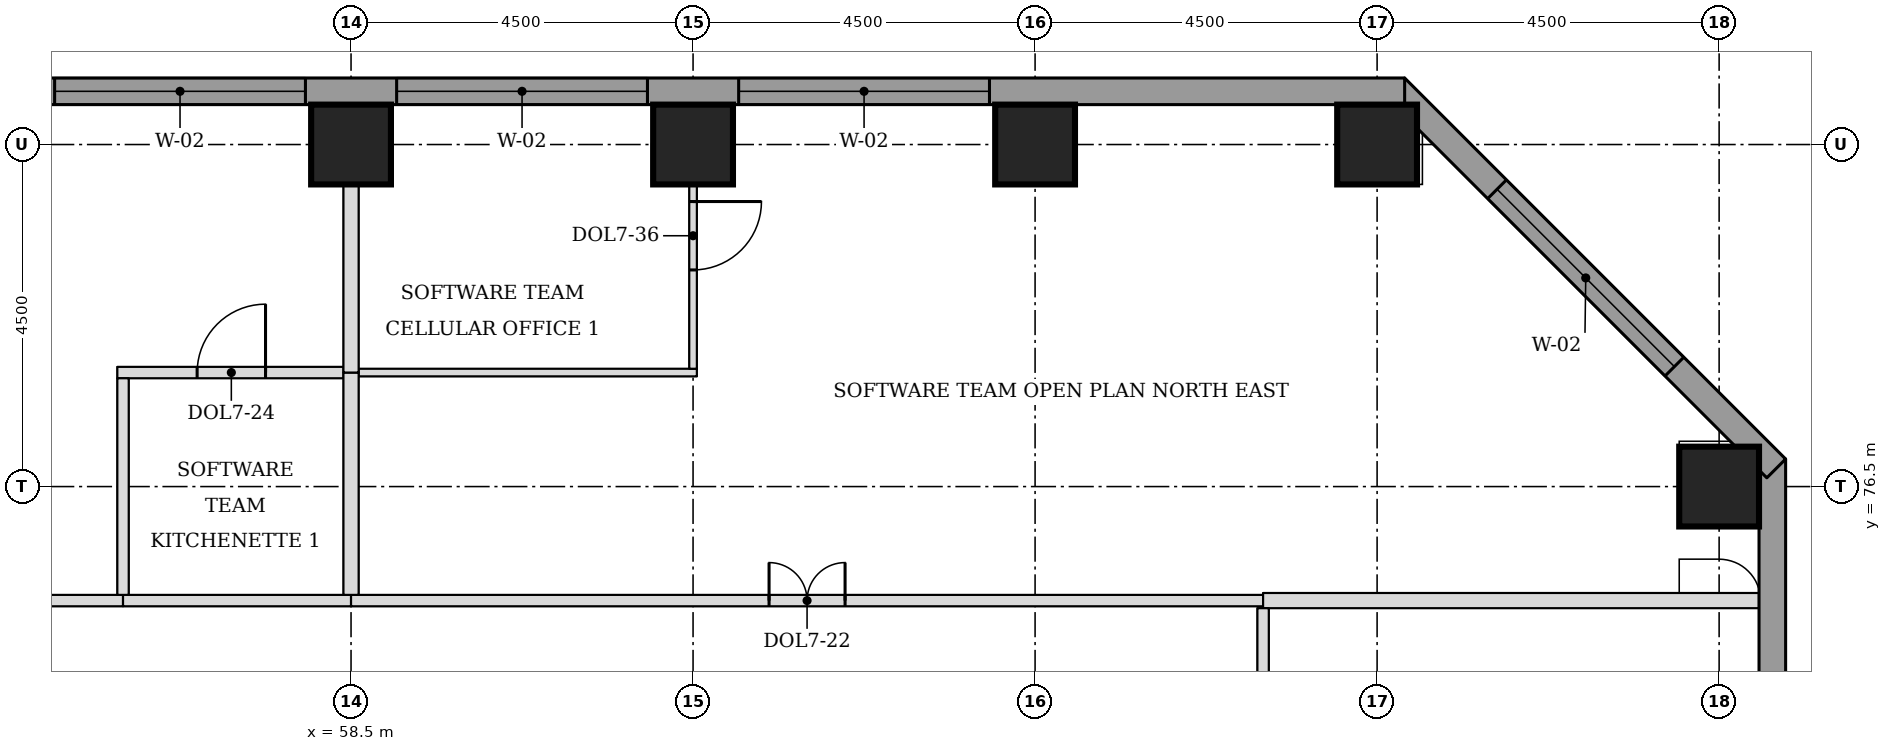
"""IFC4 building model, lengths in metres.
Left out: names, types, materials, properties, quantities, classifications, styles, units other than length and angle.
Written with IfcOpenShell. Run it as: python <this file> out.ifc"""

import sys

from ifc_helpers import new_model, si_unit, direction, frame, frame_2d, origin, origin_2d, place, context, subcontext, project, spatial, rectangle, extrude, element, fill, save


model = new_model("IFC4")
c1 = context("Model", 3, precision=1e-05, world=origin(), true_north=direction((0.0, 1.0)))
c2 = subcontext(c1, "Body", "Model", "MODEL_VIEW")
j1 = project(units=[si_unit("LENGTHUNIT", "METRE"), si_unit("PLANEANGLEUNIT", "RADIAN")], contexts=[c1])
p1 = place(None, origin())
s1 = spatial("IfcSite", under=j1, at=p1, CompositionType="ELEMENT")
p2 = place(p1, origin())
s2 = spatial("IfcBuilding", under=s1, at=p2, CompositionType="ELEMENT")
p3 = place(p2, frame((0.0, 0.0, 134.4)))
s3 = spatial("IfcBuildingStorey", under=s2, at=p3, CompositionType="ELEMENT", Elevation=134.4)
for number, where, z_axis, x_axis in (
    (1, (76.5, 76.5, 0.0), (0.0, 0.0, 1.0), (1.0, 0.0, 0.0)),
    (2, (58.5, 81.0, 0.0), (0.0, 0.0, 1.0), (1.0, 0.0, 0.0)),
    (3, (63.0, 81.0, 0.0), (0.0, 0.0, 1.0), (1.0, 0.0, 0.0)),
    (4, (67.5, 81.0, 0.0), (0.0, 0.0, 1.0), (1.0, 0.0, 0.0)),
    (5, (72.0, 81.0, 0.0), (0.0, 0.0, 1.0), (1.0, 0.0, 0.0)),
):
    element("IfcColumn", number, at=place(p3, frame(where, z_axis=z_axis, x_axis=x_axis)), inside=s3, PredefinedType="COLUMN", context=c2, shape_type="SweptSolid", body=[
        extrude(rectangle(XDim=1.05, YDim=1.05, at=origin_2d()), origin(), (0.0, 0.0, 1.0), 3.7),
    ])
p4 = place(p3, frame((77.2, 44.638, 0.0), z_axis=(0.0, 0.0, 1.0), x_axis=(0.0, 1.0, 0.0)))
e6 = element("IfcWall", 6, at=p4, inside=s3, PredefinedType="STANDARD", context=c2, shape_type="SweptSolid", body=[
    extrude(rectangle(XDim=32.225, YDim=0.35, at=frame_2d((16.112, 0.0))), origin(), (0.0, 0.0, 1.0), 3.525),
])
p5 = place(p4, frame((5.462, 0.0, 0.9)))
e7 = element("IfcOpeningElement", 7, at=p5, cuts=e6, PredefinedType="OPENING", context=c2, shape_type="SweptSolid", body=[
    extrude(rectangle(XDim=3.3, YDim=1.9, at=frame_2d((1.65, 0.95))), frame((0.0, 0.185, 0.0), z_axis=(0.0, -1.0, 0.0), x_axis=(1.0, 0.0, 0.0)), (0.0, 0.0, 1.0), 0.37),
])
p6 = place(p4, frame((9.962, 0.0, 0.9)))
e8 = element("IfcOpeningElement", 8, at=p6, cuts=e6, PredefinedType="OPENING", context=c2, shape_type="SweptSolid", body=[
    extrude(rectangle(XDim=3.3, YDim=1.9, at=frame_2d((1.65, 0.95))), frame((0.0, 0.185, 0.0), z_axis=(0.0, -1.0, 0.0), x_axis=(1.0, 0.0, 0.0)), (0.0, 0.0, 1.0), 0.37),
])
p7 = place(p4, frame((14.462, 0.0, 0.9)))
e9 = element("IfcOpeningElement", 9, at=p7, cuts=e6, PredefinedType="OPENING", context=c2, shape_type="SweptSolid", body=[
    extrude(rectangle(XDim=3.3, YDim=1.9, at=frame_2d((1.65, 0.95))), frame((0.0, 0.185, 0.0), z_axis=(0.0, -1.0, 0.0), x_axis=(1.0, 0.0, 0.0)), (0.0, 0.0, 1.0), 0.37),
])
p8 = place(p4, frame((18.962, 0.0, 0.9)))
e10 = element("IfcOpeningElement", 10, at=p8, cuts=e6, PredefinedType="OPENING", context=c2, shape_type="SweptSolid", body=[
    extrude(rectangle(XDim=3.3, YDim=1.9, at=frame_2d((1.65, 0.95))), frame((0.0, 0.185, 0.0), z_axis=(0.0, -1.0, 0.0), x_axis=(1.0, 0.0, 0.0)), (0.0, 0.0, 1.0), 0.37),
])
p9 = place(p4, frame((23.462, 0.0, 0.9)))
e11 = element("IfcOpeningElement", 11, at=p9, cuts=e6, PredefinedType="OPENING", context=c2, shape_type="SweptSolid", body=[
    extrude(rectangle(XDim=3.3, YDim=1.9, at=frame_2d((1.65, 0.95))), frame((0.0, 0.185, 0.0), z_axis=(0.0, -1.0, 0.0), x_axis=(1.0, 0.0, 0.0)), (0.0, 0.0, 1.0), 0.37),
])
p10 = place(p3, frame((77.251, 76.739, 0.0), z_axis=(0.0, 0.0, 1.0), x_axis=(-0.707106781187, 0.707106781187, 0.0)))
e12 = element("IfcWall", 12, at=p10, inside=s3, PredefinedType="STANDARD", context=c2, shape_type="SweptSolid", body=[
    extrude(rectangle(XDim=7.089, YDim=0.35, at=frame_2d((3.544, 0.0))), origin(), (0.0, 0.0, 1.0), 3.525),
])
p11 = place(p10, frame((1.894, 0.0, 0.9)))
e13 = element("IfcOpeningElement", 13, at=p11, cuts=e12, PredefinedType="OPENING", context=c2, shape_type="SweptSolid", body=[
    extrude(rectangle(XDim=3.3, YDim=1.9, at=frame_2d((1.65, 0.95))), frame((0.0, 0.185, 0.0), z_axis=(0.0, -1.0, 0.0), x_axis=(1.0, 0.0, 0.0)), (0.0, 0.0, 1.0), 0.37),
])
p12 = place(p3, frame((72.362, 81.7, 0.0), z_axis=(0.0, 0.0, 1.0), x_axis=(-1.0, 0.0, 0.0)))
e14 = element("IfcWall", 14, at=p12, inside=s3, PredefinedType="STANDARD", context=c2, shape_type="SweptSolid", body=[
    extrude(rectangle(XDim=32.225, YDim=0.35, at=frame_2d((16.112, 0.0))), origin(), (0.0, 0.0, 1.0), 3.525),
])
p13 = place(p12, frame((5.462, 0.0, 0.9)))
e15 = element("IfcOpeningElement", 15, at=p13, cuts=e14, PredefinedType="OPENING", context=c2, shape_type="SweptSolid", body=[
    extrude(rectangle(XDim=3.3, YDim=1.9, at=frame_2d((1.65, 0.95))), frame((0.0, 0.185, 0.0), z_axis=(0.0, -1.0, 0.0), x_axis=(1.0, 0.0, 0.0)), (0.0, 0.0, 1.0), 0.37),
])
p14 = place(p12, frame((9.962, 0.0, 0.9)))
e16 = element("IfcOpeningElement", 16, at=p14, cuts=e14, PredefinedType="OPENING", context=c2, shape_type="SweptSolid", body=[
    extrude(rectangle(XDim=3.3, YDim=1.9, at=frame_2d((1.65, 0.95))), frame((0.0, 0.185, 0.0), z_axis=(0.0, -1.0, 0.0), x_axis=(1.0, 0.0, 0.0)), (0.0, 0.0, 1.0), 0.37),
])
p15 = place(p12, frame((14.462, 0.0, 0.9)))
e17 = element("IfcOpeningElement", 17, at=p15, cuts=e14, PredefinedType="OPENING", context=c2, shape_type="SweptSolid", body=[
    extrude(rectangle(XDim=3.3, YDim=1.9, at=frame_2d((1.65, 0.95))), frame((0.0, 0.185, 0.0), z_axis=(0.0, -1.0, 0.0), x_axis=(1.0, 0.0, 0.0)), (0.0, 0.0, 1.0), 0.37),
])
p16 = place(p12, frame((18.962, 0.0, 0.9)))
e18 = element("IfcOpeningElement", 18, at=p16, cuts=e14, PredefinedType="OPENING", context=c2, shape_type="SweptSolid", body=[
    extrude(rectangle(XDim=3.3, YDim=1.9, at=frame_2d((1.65, 0.95))), frame((0.0, 0.185, 0.0), z_axis=(0.0, -1.0, 0.0), x_axis=(1.0, 0.0, 0.0)), (0.0, 0.0, 1.0), 0.37),
])
p17 = place(p12, frame((23.462, 0.0, 0.9)))
e19 = element("IfcOpeningElement", 19, at=p17, cuts=e14, PredefinedType="OPENING", context=c2, shape_type="SweptSolid", body=[
    extrude(rectangle(XDim=3.3, YDim=1.9, at=frame_2d((1.65, 0.95))), frame((0.0, 0.185, 0.0), z_axis=(0.0, -1.0, 0.0), x_axis=(1.0, 0.0, 0.0)), (0.0, 0.0, 1.0), 0.37),
])
p18 = place(p3, frame((46.5, 75.0, 0.0), z_axis=(0.0, 0.0, 1.0), x_axis=(1.0, 0.0, 0.0)))
e20 = element("IfcWall", 20, at=p18, inside=s3, PredefinedType="PARTITIONING", context=c2, shape_type="SweptSolid", body=[
    extrude(rectangle(XDim=9.0, YDim=0.15, at=frame_2d((4.5, 0.0))), origin(), (0.0, 0.0, 1.0), 3.55),
])
p19 = place(p3, frame((55.5, 75.0, 0.0), z_axis=(0.0, 0.0, 1.0), x_axis=(1.0, 0.0, 0.0)))
e21 = element("IfcWall", 21, at=p19, inside=s3, PredefinedType="PARTITIONING", context=c2, shape_type="SweptSolid", body=[
    extrude(rectangle(XDim=3.0, YDim=0.15, at=frame_2d((1.5, 0.0))), origin(), (0.0, 0.0, 1.0), 3.55),
])
p20 = place(p3, frame((58.5, 75.0, 0.0), z_axis=(0.0, 0.0, 1.0), x_axis=(1.0, 0.0, 0.0)))
e22 = element("IfcWall", 22, at=p20, inside=s3, PredefinedType="PARTITIONING", context=c2, shape_type="SweptSolid", body=[
    extrude(rectangle(XDim=12.0, YDim=0.15, at=frame_2d((6.0, 0.0))), origin(), (0.0, 0.0, 1.0), 3.55),
])
p21 = place(p20, frame((5.5, 0.0, 0.0)))
e23 = element("IfcOpeningElement", 23, at=p21, cuts=e22, PredefinedType="OPENING", context=c2, shape_type="SweptSolid", body=[
    extrude(rectangle(XDim=1.0, YDim=2.1, at=frame_2d((0.5, 1.05))), frame((0.0, 0.085, 0.0), z_axis=(0.0, -1.0, 0.0), x_axis=(1.0, 0.0, 0.0)), (0.0, 0.0, 1.0), 0.17),
])
p22 = place(p3, frame((70.5, 75.0, 0.0), z_axis=(0.0, 0.0, 1.0), x_axis=(1.0, 0.0, 0.0)))
e24 = element("IfcWall", 24, at=p22, inside=s3, PredefinedType="PARTITIONING", context=c2, shape_type="SweptSolid", body=[
    extrude(rectangle(XDim=6.525, YDim=0.2, at=frame_2d((3.262, 0.0))), origin(), (0.0, 0.0, 1.0), 3.55),
])
p23 = place(p3, frame((55.425, 78.0, 0.0), z_axis=(0.0, 0.0, 1.0), x_axis=(1.0, 0.0, 0.0)))
e25 = element("IfcWall", 25, at=p23, inside=s3, PredefinedType="PARTITIONING", context=c2, shape_type="SweptSolid", body=[
    extrude(rectangle(XDim=2.975, YDim=0.15, at=frame_2d((1.487, 0.0))), origin(), (0.0, 0.0, 1.0), 3.55),
])
p24 = place(p23, frame((1.05, 0.0, 0.0)))
e26 = element("IfcOpeningElement", 26, at=p24, cuts=e25, PredefinedType="OPENING", context=c2, shape_type="SweptSolid", body=[
    extrude(rectangle(XDim=0.9, YDim=2.1, at=frame_2d((0.45, 1.05))), frame((0.0, 0.085, 0.0), z_axis=(0.0, -1.0, 0.0), x_axis=(1.0, 0.0, 0.0)), (0.0, 0.0, 1.0), 0.17),
])
p25 = place(p3, frame((58.6, 78.0, 0.0), z_axis=(0.0, 0.0, 1.0), x_axis=(1.0, 0.0, 0.0)))
e27 = element("IfcWall", 27, at=p25, inside=s3, PredefinedType="PARTITIONING", context=c2, shape_type="SweptSolid", body=[
    extrude(rectangle(XDim=4.45, YDim=0.1, at=frame_2d((2.225, 0.0))), origin(), (0.0, 0.0, 1.0), 3.55),
])
p26 = place(p3, frame((70.5, 63.0, 0.0), z_axis=(0.0, 0.0, 1.0), x_axis=(0.0, 1.0, 0.0)))
e28 = element("IfcWall", 28, at=p26, inside=s3, PredefinedType="PARTITIONING", context=c2, shape_type="SweptSolid", body=[
    extrude(rectangle(XDim=11.9, YDim=0.15, at=frame_2d((5.95, 0.0))), origin(), (0.0, 0.0, 1.0), 3.55),
])
p27 = place(p26, frame((5.45, 0.0, 0.0)))
e29 = element("IfcOpeningElement", 29, at=p27, cuts=e28, PredefinedType="OPENING", context=c2, shape_type="SweptSolid", body=[
    extrude(rectangle(XDim=1.0, YDim=2.1, at=frame_2d((0.5, 1.05))), frame((0.0, 0.085, 0.0), z_axis=(0.0, -1.0, 0.0), x_axis=(1.0, 0.0, 0.0)), (0.0, 0.0, 1.0), 0.17),
])
p28 = place(p3, frame((55.5, 75.075, 0.0), z_axis=(0.0, 0.0, 1.0), x_axis=(0.0, 1.0, 0.0)))
e30 = element("IfcWall", 30, at=p28, inside=s3, PredefinedType="PARTITIONING", context=c2, shape_type="SweptSolid", body=[
    extrude(rectangle(XDim=2.85, YDim=0.15, at=frame_2d((1.425, 0.0))), origin(), (0.0, 0.0, 1.0), 3.55),
])
p29 = place(p3, frame((58.5, 75.075, 0.0), z_axis=(0.0, 0.0, 1.0), x_axis=(0.0, 1.0, 0.0)))
e31 = element("IfcWall", 31, at=p29, inside=s3, PredefinedType="PARTITIONING", context=c2, shape_type="SweptSolid", body=[
    extrude(rectangle(XDim=2.925, YDim=0.2, at=frame_2d((1.462, 0.0))), origin(), (0.0, 0.0, 1.0), 3.55),
])
p30 = place(p3, frame((58.5, 78.0, 0.0), z_axis=(0.0, 0.0, 1.0), x_axis=(0.0, 1.0, 0.0)))
e32 = element("IfcWall", 32, at=p30, inside=s3, PredefinedType="PARTITIONING", context=c2, shape_type="SweptSolid", body=[
    extrude(rectangle(XDim=3.525, YDim=0.2, at=frame_2d((1.762, 0.0))), origin(), (0.0, 0.0, 1.0), 3.55),
])
p31 = place(p3, frame((63.0, 78.05, 0.0), z_axis=(0.0, 0.0, 1.0), x_axis=(0.0, 1.0, 0.0)))
e33 = element("IfcWall", 33, at=p31, inside=s3, PredefinedType="PARTITIONING", context=c2, shape_type="SweptSolid", body=[
    extrude(rectangle(XDim=3.475, YDim=0.1, at=frame_2d((1.737, 0.0))), origin(), (0.0, 0.0, 1.0), 3.55),
])
p32 = place(p31, frame((1.3, 0.0, 0.0)))
e34 = element("IfcOpeningElement", 34, at=p32, cuts=e33, PredefinedType="OPENING", context=c2, shape_type="SweptSolid", body=[
    extrude(rectangle(XDim=0.9, YDim=2.1, at=frame_2d((0.45, 1.05))), frame((0.0, 0.06, 0.0), z_axis=(0.0, -1.0, 0.0), x_axis=(1.0, 0.0, 0.0)), (0.0, 0.0, 1.0), 0.12),
])
p33 = place(p11, origin())
e35 = element("IfcWindow", 35, at=p33, inside=s3, PartitioningType="SINGLE_PANEL", PredefinedType="WINDOW", context=c2, shape_type="SweptSolid", body=[
    extrude(rectangle(XDim=3.3, YDim=1.9, at=frame_2d((1.65, 0.95))), frame((0.0, 0.085, 0.0), z_axis=(0.0, -1.0, 0.0), x_axis=(1.0, 0.0, 0.0)), (0.0, 0.0, 1.0), 0.06),
])
fill(e13, e35)
p34 = place(p13, origin())
e36 = element("IfcWindow", 36, at=p34, inside=s3, PartitioningType="SINGLE_PANEL", PredefinedType="WINDOW", context=c2, shape_type="SweptSolid", body=[
    extrude(rectangle(XDim=3.3, YDim=1.9, at=frame_2d((1.65, 0.95))), frame((0.0, 0.085, 0.0), z_axis=(0.0, -1.0, 0.0), x_axis=(1.0, 0.0, 0.0)), (0.0, 0.0, 1.0), 0.06),
])
fill(e15, e36)
p35 = place(p14, origin())
e37 = element("IfcWindow", 37, at=p35, inside=s3, PartitioningType="SINGLE_PANEL", PredefinedType="WINDOW", context=c2, shape_type="SweptSolid", body=[
    extrude(rectangle(XDim=3.3, YDim=1.9, at=frame_2d((1.65, 0.95))), frame((0.0, 0.085, 0.0), z_axis=(0.0, -1.0, 0.0), x_axis=(1.0, 0.0, 0.0)), (0.0, 0.0, 1.0), 0.06),
])
fill(e16, e37)
p36 = place(p15, origin())
e38 = element("IfcWindow", 38, at=p36, inside=s3, PartitioningType="SINGLE_PANEL", PredefinedType="WINDOW", context=c2, shape_type="SweptSolid", body=[
    extrude(rectangle(XDim=3.3, YDim=1.9, at=frame_2d((1.65, 0.95))), frame((0.0, 0.085, 0.0), z_axis=(0.0, -1.0, 0.0), x_axis=(1.0, 0.0, 0.0)), (0.0, 0.0, 1.0), 0.06),
])
fill(e17, e38)
p37 = place(p24, origin())
e39 = element("IfcDoor", 39, at=p37, inside=s3, OperationType="SINGLE_SWING_RIGHT", PredefinedType="DOOR", context=c2, shape_type="SweptSolid", body=[
    extrude(rectangle(XDim=0.9, YDim=2.1, at=frame_2d((0.45, 1.05))), frame((0.0, 0.025, 0.0), z_axis=(0.0, -1.0, 0.0), x_axis=(1.0, 0.0, 0.0)), (0.0, 0.0, 1.0), 0.05),
])
fill(e26, e39)
p38 = place(p21, origin())
e40 = element("IfcDoor", 40, at=p38, inside=s3, OperationType="DOUBLE_DOOR_SINGLE_SWING", PredefinedType="DOOR", context=c2, shape_type="SweptSolid", body=[
    extrude(rectangle(XDim=1.0, YDim=2.1, at=frame_2d((0.5, 1.05))), frame((0.0, 0.025, 0.0), z_axis=(0.0, -1.0, 0.0), x_axis=(1.0, 0.0, 0.0)), (0.0, 0.0, 1.0), 0.05),
])
fill(e23, e40)
p39 = place(p32, frame((0.9, 0.0, 0.0), z_axis=(0.0, 0.0, 1.0), x_axis=(-1.0, 0.0, 0.0)))
e41 = element("IfcDoor", 41, at=p39, inside=s3, OperationType="SINGLE_SWING_LEFT", PredefinedType="DOOR", context=c2, shape_type="SweptSolid", body=[
    extrude(rectangle(XDim=0.9, YDim=2.1, at=frame_2d((0.45, 1.05))), frame((0.0, 0.025, 0.0), z_axis=(0.0, -1.0, 0.0), x_axis=(1.0, 0.0, 0.0)), (0.0, 0.0, 1.0), 0.05),
])
fill(e34, e41)
save(model, sys.argv[1])
